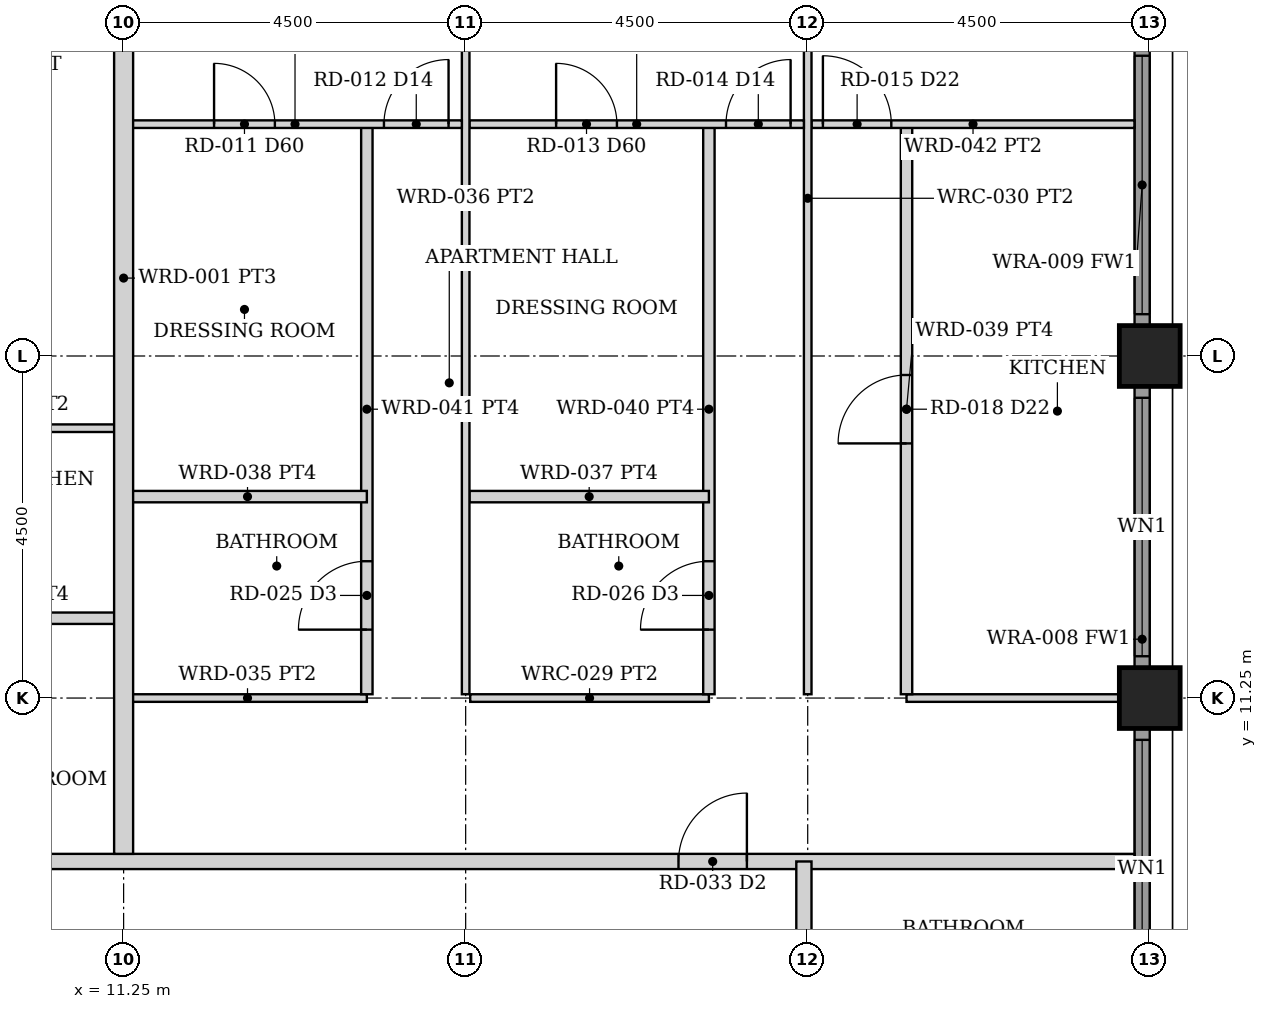
"""IFC4 building model, lengths in metres.
Left out: names, types, materials, properties, quantities, classifications, styles, units other than length and angle.
Written with IfcOpenShell. Run it as: python <this file> out.ifc"""

import sys

from ifc_helpers import new_model, si_unit, direction, frame, frame_2d, origin, origin_2d, place, context, subcontext, project, spatial, rectangle, hollow_rectangle, extrude, element, fill, save


model = new_model("IFC4")
c1 = context("Model", 3, precision=1e-05, world=origin(), true_north=direction((0.0, 1.0)))
c2 = subcontext(c1, "Body", "Model", "MODEL_VIEW")
j1 = project(units=[si_unit("LENGTHUNIT", "METRE"), si_unit("PLANEANGLEUNIT", "RADIAN")], contexts=[c1])
p1 = place(None, origin())
s1 = spatial("IfcSite", under=j1, at=p1, CompositionType="ELEMENT")
p2 = place(p1, origin())
s2 = spatial("IfcBuilding", under=s1, at=p2, CompositionType="ELEMENT")
p3 = place(p2, frame((0.0, 0.0, 58.0)))
s3 = spatial("IfcBuildingStorey", under=s2, at=p3, CompositionType="ELEMENT", Elevation=58.0)
for number, where, z_axis, x_axis in (
    (1, (24.75, 11.25, 0.0), (0.0, 0.0, 1.0), (1.0, 0.0, 0.0)),
    (2, (24.75, 15.75, 0.0), (0.0, 0.0, 1.0), (1.0, 0.0, 0.0)),
):
    element("IfcColumn", number, at=place(p3, frame(where, z_axis=z_axis, x_axis=x_axis)), inside=s3, PredefinedType="COLUMN", context=c2, shape_type="SweptSolid", body=[
        extrude(hollow_rectangle(XDim=0.8, YDim=0.8, WallThickness=0.06, at=origin_2d()), origin(), (0.0, 0.0, 1.0), 3.5),
    ])
p4 = place(p3, frame((24.65, 7.155, 0.0), z_axis=(0.0, 0.0, 1.0), x_axis=(0.0, 1.0, 0.0)))
e3 = element("IfcWall", 3, at=p4, inside=s3, PredefinedType="SOLIDWALL", context=c2, shape_type="SweptSolid", body=[
    extrude(rectangle(XDim=3.69, YDim=0.2, at=frame_2d((1.845, 0.0))), origin(), (0.0, 0.0, 1.0), 2.379),
])
p5 = place(p4, frame((0.145, 0.0, 0.3)))
e4 = element("IfcOpeningElement", 4, at=p5, cuts=e3, PredefinedType="OPENING", context=c2, shape_type="SweptSolid", body=[
    extrude(rectangle(XDim=3.4, YDim=1.929, at=frame_2d((1.7, 0.964))), frame((0.0, 0.11, 0.0), z_axis=(0.0, -1.0, 0.0), x_axis=(1.0, 0.0, 0.0)), (0.0, 0.0, 1.0), 0.22),
])
p6 = place(p3, frame((24.65, 11.655, 0.0), z_axis=(0.0, 0.0, 1.0), x_axis=(0.0, 1.0, 0.0)))
e5 = element("IfcWall", 5, at=p6, inside=s3, PredefinedType="SOLIDWALL", context=c2, shape_type="SweptSolid", body=[
    extrude(rectangle(XDim=3.69, YDim=0.2, at=frame_2d((1.845, 0.0))), origin(), (0.0, 0.0, 1.0), 2.379),
])
p7 = place(p6, frame((0.145, 0.0, 0.3)))
e6 = element("IfcOpeningElement", 6, at=p7, cuts=e5, PredefinedType="OPENING", context=c2, shape_type="SweptSolid", body=[
    extrude(rectangle(XDim=3.4, YDim=1.929, at=frame_2d((1.7, 0.964))), frame((0.0, 0.11, 0.0), z_axis=(0.0, -1.0, 0.0), x_axis=(1.0, 0.0, 0.0)), (0.0, 0.0, 1.0), 0.22),
])
p8 = place(p3, frame((24.65, 16.155, 0.0), z_axis=(0.0, 0.0, 1.0), x_axis=(0.0, 1.0, 0.0)))
e7 = element("IfcWall", 7, at=p8, inside=s3, PredefinedType="SOLIDWALL", context=c2, shape_type="SweptSolid", body=[
    extrude(rectangle(XDim=3.69, YDim=0.2, at=frame_2d((1.845, 0.0))), origin(), (0.0, 0.0, 1.0), 2.379),
])
p9 = place(p8, frame((0.145, 0.0, 0.3)))
e8 = element("IfcOpeningElement", 8, at=p9, cuts=e7, PredefinedType="OPENING", context=c2, shape_type="SweptSolid", body=[
    extrude(rectangle(XDim=3.4, YDim=1.929, at=frame_2d((1.7, 0.964))), frame((0.0, 0.11, 0.0), z_axis=(0.0, -1.0, 0.0), x_axis=(1.0, 0.0, 0.0)), (0.0, 0.0, 1.0), 0.22),
])
p10 = place(p3, frame((-24.55, 9.1, 0.0), z_axis=(0.0, 0.0, 1.0), x_axis=(1.0, 0.0, 0.0)))
e9 = element("IfcWall", 9, at=p10, inside=s3, PredefinedType="PARTITIONING", context=c2, shape_type="SweptSolid", body=[
    extrude(rectangle(XDim=49.1, YDim=0.2, at=frame_2d((24.55, 0.0))), origin(), (0.0, 0.0, 1.0), 2.373),
])
p11 = place(p10, frame((5.1, 0.0, 0.0)))
e10 = element("IfcOpeningElement", 10, at=p11, cuts=e9, PredefinedType="OPENING", context=c2, shape_type="SweptSolid", body=[
    extrude(rectangle(XDim=0.9, YDim=2.1, at=frame_2d((0.45, 1.05))), frame((0.0, 0.11, 0.0), z_axis=(0.0, -1.0, 0.0), x_axis=(1.0, 0.0, 0.0)), (0.0, 0.0, 1.0), 0.22),
])
p12 = place(p10, frame((13.5, 0.0, 0.0)))
e11 = element("IfcOpeningElement", 11, at=p12, cuts=e9, PredefinedType="OPENING", context=c2, shape_type="SweptSolid", body=[
    extrude(rectangle(XDim=0.9, YDim=2.1, at=frame_2d((0.45, 1.05))), frame((0.0, 0.11, 0.0), z_axis=(0.0, -1.0, 0.0), x_axis=(1.0, 0.0, 0.0)), (0.0, 0.0, 1.0), 0.22),
])
p13 = place(p10, frame((18.1, 0.0, 0.0)))
e12 = element("IfcOpeningElement", 12, at=p13, cuts=e9, PredefinedType="OPENING", context=c2, shape_type="SweptSolid", body=[
    extrude(rectangle(XDim=0.9, YDim=2.1, at=frame_2d((0.45, 1.05))), frame((0.0, 0.11, 0.0), z_axis=(0.0, -1.0, 0.0), x_axis=(1.0, 0.0, 0.0)), (0.0, 0.0, 1.0), 0.22),
])
p14 = place(p10, frame((31.5, 0.0, 0.0)))
e13 = element("IfcOpeningElement", 13, at=p14, cuts=e9, PredefinedType="OPENING", context=c2, shape_type="SweptSolid", body=[
    extrude(rectangle(XDim=0.9, YDim=2.1, at=frame_2d((0.45, 1.05))), frame((0.0, 0.11, 0.0), z_axis=(0.0, -1.0, 0.0), x_axis=(1.0, 0.0, 0.0)), (0.0, 0.0, 1.0), 0.22),
])
p15 = place(p10, frame((43.1, 0.0, 0.0)))
e14 = element("IfcOpeningElement", 14, at=p15, cuts=e9, PredefinedType="OPENING", context=c2, shape_type="SweptSolid", body=[
    extrude(rectangle(XDim=0.9, YDim=2.1, at=frame_2d((0.45, 1.05))), frame((0.0, 0.11, 0.0), z_axis=(0.0, -1.0, 0.0), x_axis=(1.0, 0.0, 0.0)), (0.0, 0.0, 1.0), 0.22),
])
p16 = place(p3, frame((20.2, -9.1, 0.0), z_axis=(0.0, 0.0, 1.0), x_axis=(0.0, 1.0, 0.0)))
e15 = element("IfcWall", 15, at=p16, inside=s3, PredefinedType="PARTITIONING", context=c2, shape_type="SweptSolid", body=[
    extrude(rectangle(XDim=18.2, YDim=0.2, at=frame_2d((9.1, 0.0))), origin(), (0.0, 0.0, 1.0), 2.373),
])
p17 = place(p16, frame((6.4, 0.0, 0.0)))
e16 = element("IfcOpeningElement", 16, at=p17, cuts=e15, PredefinedType="OPENING", context=c2, shape_type="SweptSolid", body=[
    extrude(rectangle(XDim=0.9, YDim=2.1, at=frame_2d((0.45, 1.05))), frame((0.0, 0.11, 0.0), z_axis=(0.0, -1.0, 0.0), x_axis=(1.0, 0.0, 0.0)), (0.0, 0.0, 1.0), 0.22),
])
p18 = place(p3, frame((8.1, 12.3, 0.0), z_axis=(0.0, 0.0, 1.0), x_axis=(1.0, 0.0, 0.0)))
e17 = element("IfcWall", 17, at=p18, inside=s3, PredefinedType="PARTITIONING", context=c2, shape_type="SweptSolid", body=[
    extrude(rectangle(XDim=3.05, YDim=0.15, at=frame_2d((1.525, 0.0))), origin(), (0.0, 0.0, 1.0), 2.373),
])
p19 = place(p3, frame((8.1, 14.8, 0.0), z_axis=(0.0, 0.0, 1.0), x_axis=(1.0, 0.0, 0.0)))
e18 = element("IfcWall", 18, at=p19, inside=s3, PredefinedType="PARTITIONING", context=c2, shape_type="SweptSolid", body=[
    extrude(rectangle(XDim=3.05, YDim=0.1, at=frame_2d((1.525, 0.0))), origin(), (0.0, 0.0, 1.0), 2.373),
])
p20 = place(p3, frame((21.55, 11.25, 0.0), z_axis=(0.0, 0.0, 1.0), x_axis=(1.0, 0.0, 0.0)))
e19 = element("IfcWall", 19, at=p20, inside=s3, PredefinedType="PARTITIONING", context=c2, shape_type="SweptSolid", body=[
    extrude(rectangle(XDim=2.8, YDim=0.1, at=frame_2d((1.4, 0.0))), origin(), (0.0, 0.0, 1.0), 2.373),
])
p21 = place(p3, frame((21.55, 11.3, 0.0), z_axis=(0.0, 0.0, 1.0), x_axis=(0.0, 1.0, 0.0)))
e20 = element("IfcWall", 20, at=p21, inside=s3, PredefinedType="PARTITIONING", context=c2, shape_type="SweptSolid", body=[
    extrude(rectangle(XDim=7.5, YDim=0.15, at=frame_2d((3.75, 0.0))), origin(), (0.0, 0.0, 1.0), 2.373),
])
p22 = place(p21, frame((3.3, 0.0, 0.0)))
e21 = element("IfcOpeningElement", 21, at=p22, cuts=e20, PredefinedType="OPENING", context=c2, shape_type="SweptSolid", body=[
    extrude(rectangle(XDim=0.9, YDim=2.1, at=frame_2d((0.45, 1.05))), frame((0.0, 0.085, 0.0), z_axis=(0.0, -1.0, 0.0), x_axis=(1.0, 0.0, 0.0)), (0.0, 0.0, 1.0), 0.17),
])
p23 = place(p3, frame((20.3, 18.8, 0.0), z_axis=(0.0, 0.0, 1.0), x_axis=(1.0, 0.0, 0.0)))
e22 = element("IfcWall", 22, at=p23, inside=s3, PredefinedType="PARTITIONING", context=c2, shape_type="SweptSolid", body=[
    extrude(rectangle(XDim=4.25, YDim=0.1, at=frame_2d((2.125, 0.0))), origin(), (0.0, 0.0, 1.0), 2.373),
])
p24 = place(p23, frame((0.15, 0.0, 0.0)))
e23 = element("IfcOpeningElement", 23, at=p24, cuts=e22, PredefinedType="OPENING", context=c2, shape_type="SweptSolid", body=[
    extrude(rectangle(XDim=0.9, YDim=2.1, at=frame_2d((0.45, 1.05))), frame((0.0, 0.06, 0.0), z_axis=(0.0, -1.0, 0.0), x_axis=(1.0, 0.0, 0.0)), (0.0, 0.0, 1.0), 0.12),
])
p25 = place(p3, frame((20.25, 11.3, 0.0), z_axis=(0.0, 0.0, 1.0), x_axis=(0.0, 1.0, 0.0)))
e24 = element("IfcWall", 24, at=p25, inside=s3, PredefinedType="PARTITIONING", context=c2, shape_type="SweptSolid", body=[
    extrude(rectangle(XDim=13.05, YDim=0.1, at=frame_2d((6.525, 0.0))), origin(), (0.0, 0.0, 1.0), 2.373),
])
p26 = place(p3, frame((15.81, 11.25, 0.0), z_axis=(0.0, 0.0, 1.0), x_axis=(1.0, 0.0, 0.0)))
e25 = element("IfcWall", 25, at=p26, inside=s3, PredefinedType="PARTITIONING", context=c2, shape_type="SweptSolid", body=[
    extrude(rectangle(XDim=3.14, YDim=0.1, at=frame_2d((1.57, 0.0))), origin(), (0.0, 0.0, 1.0), 2.373),
])
p27 = place(p3, frame((18.95, 11.3, 0.0), z_axis=(0.0, 0.0, 1.0), x_axis=(0.0, 1.0, 0.0)))
e26 = element("IfcWall", 26, at=p27, inside=s3, PredefinedType="PARTITIONING", context=c2, shape_type="SweptSolid", body=[
    extrude(rectangle(XDim=7.5, YDim=0.15, at=frame_2d((3.75, 0.0))), origin(), (0.0, 0.0, 1.0), 2.373),
])
p28 = place(p27, frame((0.85, 0.0, 0.0)))
e27 = element("IfcOpeningElement", 27, at=p28, cuts=e26, PredefinedType="OPENING", context=c2, shape_type="SweptSolid", body=[
    extrude(rectangle(XDim=0.9, YDim=2.1, at=frame_2d((0.45, 1.05))), frame((0.0, 0.085, 0.0), z_axis=(0.0, -1.0, 0.0), x_axis=(1.0, 0.0, 0.0)), (0.0, 0.0, 1.0), 0.17),
])
p29 = place(p3, frame((15.8, 18.8, 0.0), z_axis=(0.0, 0.0, 1.0), x_axis=(1.0, 0.0, 0.0)))
e28 = element("IfcWall", 28, at=p29, inside=s3, PredefinedType="PARTITIONING", context=c2, shape_type="SweptSolid", body=[
    extrude(rectangle(XDim=4.4, YDim=0.1, at=frame_2d((2.2, 0.0))), origin(), (0.0, 0.0, 1.0), 2.373),
])
p30 = place(p29, frame((3.375, 0.0, 0.0)))
e29 = element("IfcOpeningElement", 29, at=p30, cuts=e28, PredefinedType="OPENING", context=c2, shape_type="SweptSolid", body=[
    extrude(rectangle(XDim=0.85, YDim=2.1, at=frame_2d((0.425, 1.05))), frame((0.0, 0.06, 0.0), z_axis=(0.0, -1.0, 0.0), x_axis=(1.0, 0.0, 0.0)), (0.0, 0.0, 1.0), 0.12),
])
p31 = place(p29, frame((1.14, 0.0, 0.0)))
e30 = element("IfcOpeningElement", 30, at=p31, cuts=e28, PredefinedType="OPENING", context=c2, shape_type="SweptSolid", body=[
    extrude(rectangle(XDim=0.8, YDim=2.1, at=frame_2d((0.4, 1.05))), frame((0.0, 0.06, 0.0), z_axis=(0.0, -1.0, 0.0), x_axis=(1.0, 0.0, 0.0)), (0.0, 0.0, 1.0), 0.12),
])
p32 = place(p3, frame((15.8, 13.9, 0.0), z_axis=(0.0, 0.0, 1.0), x_axis=(1.0, 0.0, 0.0)))
e31 = element("IfcWall", 31, at=p32, inside=s3, PredefinedType="PARTITIONING", context=c2, shape_type="SweptSolid", body=[
    extrude(rectangle(XDim=3.15, YDim=0.15, at=frame_2d((1.575, 0.0))), origin(), (0.0, 0.0, 1.0), 2.373),
])
p33 = place(p3, frame((15.75, 11.3, 0.0), z_axis=(0.0, 0.0, 1.0), x_axis=(0.0, 1.0, 0.0)))
e32 = element("IfcWall", 32, at=p33, inside=s3, PredefinedType="PARTITIONING", context=c2, shape_type="SweptSolid", body=[
    extrude(rectangle(XDim=13.05, YDim=0.1, at=frame_2d((6.525, 0.0))), origin(), (0.0, 0.0, 1.0), 2.373),
])
p34 = place(p3, frame((11.31, 11.25, 0.0), z_axis=(0.0, 0.0, 1.0), x_axis=(1.0, 0.0, 0.0)))
e33 = element("IfcWall", 33, at=p34, inside=s3, PredefinedType="PARTITIONING", context=c2, shape_type="SweptSolid", body=[
    extrude(rectangle(XDim=3.14, YDim=0.1, at=frame_2d((1.57, 0.0))), origin(), (0.0, 0.0, 1.0), 2.373),
])
p35 = place(p3, frame((14.45, 11.3, 0.0), z_axis=(0.0, 0.0, 1.0), x_axis=(0.0, 1.0, 0.0)))
e34 = element("IfcWall", 34, at=p35, inside=s3, PredefinedType="PARTITIONING", context=c2, shape_type="SweptSolid", body=[
    extrude(rectangle(XDim=7.5, YDim=0.15, at=frame_2d((3.75, 0.0))), origin(), (0.0, 0.0, 1.0), 2.373),
])
p36 = place(p35, frame((0.85, 0.0, 0.0)))
e35 = element("IfcOpeningElement", 35, at=p36, cuts=e34, PredefinedType="OPENING", context=c2, shape_type="SweptSolid", body=[
    extrude(rectangle(XDim=0.9, YDim=2.1, at=frame_2d((0.45, 1.05))), frame((0.0, 0.085, 0.0), z_axis=(0.0, -1.0, 0.0), x_axis=(1.0, 0.0, 0.0)), (0.0, 0.0, 1.0), 0.17),
])
p37 = place(p3, frame((11.31, 18.8, 0.0), z_axis=(0.0, 0.0, 1.0), x_axis=(1.0, 0.0, 0.0)))
e36 = element("IfcWall", 36, at=p37, inside=s3, PredefinedType="PARTITIONING", context=c2, shape_type="SweptSolid", body=[
    extrude(rectangle(XDim=4.39, YDim=0.1, at=frame_2d((2.195, 0.0))), origin(), (0.0, 0.0, 1.0), 2.373),
])
p38 = place(p37, frame((3.365, 0.0, 0.0)))
e37 = element("IfcOpeningElement", 37, at=p38, cuts=e36, PredefinedType="OPENING", context=c2, shape_type="SweptSolid", body=[
    extrude(rectangle(XDim=0.85, YDim=2.1, at=frame_2d((0.425, 1.05))), frame((0.0, 0.06, 0.0), z_axis=(0.0, -1.0, 0.0), x_axis=(1.0, 0.0, 0.0)), (0.0, 0.0, 1.0), 0.12),
])
p39 = place(p37, frame((1.13, 0.0, 0.0)))
e38 = element("IfcOpeningElement", 38, at=p39, cuts=e36, PredefinedType="OPENING", context=c2, shape_type="SweptSolid", body=[
    extrude(rectangle(XDim=0.8, YDim=2.1, at=frame_2d((0.4, 1.05))), frame((0.0, 0.06, 0.0), z_axis=(0.0, -1.0, 0.0), x_axis=(1.0, 0.0, 0.0)), (0.0, 0.0, 1.0), 0.12),
])
p40 = place(p3, frame((11.31, 13.9, 0.0), z_axis=(0.0, 0.0, 1.0), x_axis=(1.0, 0.0, 0.0)))
e39 = element("IfcWall", 39, at=p40, inside=s3, PredefinedType="PARTITIONING", context=c2, shape_type="SweptSolid", body=[
    extrude(rectangle(XDim=3.14, YDim=0.15, at=frame_2d((1.57, 0.0))), origin(), (0.0, 0.0, 1.0), 2.373),
])
p41 = place(p3, frame((11.25, 9.2, 0.0), z_axis=(0.0, 0.0, 1.0), x_axis=(0.0, 1.0, 0.0)))
e40 = element("IfcWall", 40, at=p41, inside=s3, PredefinedType="PARTITIONING", context=c2, shape_type="SweptSolid", body=[
    extrude(rectangle(XDim=15.15, YDim=0.25, at=frame_2d((7.575, 0.0))), origin(), (0.0, 0.0, 1.0), 2.373),
])
p42 = place(p5, origin())
e41 = element("IfcWindow", 41, at=p42, inside=s3, PartitioningType="SINGLE_PANEL", PredefinedType="WINDOW", context=c2, shape_type="SweptSolid", body=[
    extrude(rectangle(XDim=3.4, YDim=1.929, at=frame_2d((1.7, 0.964))), frame((0.0, 0.03, 0.0), z_axis=(0.0, -1.0, 0.0), x_axis=(1.0, 0.0, 0.0)), (0.0, 0.0, 1.0), 0.06),
])
fill(e4, e41)
p43 = place(p7, origin())
e42 = element("IfcWindow", 42, at=p43, inside=s3, PartitioningType="SINGLE_PANEL", PredefinedType="WINDOW", context=c2, shape_type="SweptSolid", body=[
    extrude(rectangle(XDim=3.4, YDim=1.929, at=frame_2d((1.7, 0.964))), frame((0.0, 0.03, 0.0), z_axis=(0.0, -1.0, 0.0), x_axis=(1.0, 0.0, 0.0)), (0.0, 0.0, 1.0), 0.06),
])
fill(e6, e42)
p44 = place(p9, origin())
e43 = element("IfcWindow", 43, at=p44, inside=s3, PartitioningType="SINGLE_PANEL", PredefinedType="WINDOW", context=c2, shape_type="SweptSolid", body=[
    extrude(rectangle(XDim=3.4, YDim=1.929, at=frame_2d((1.7, 0.964))), frame((0.0, 0.03, 0.0), z_axis=(0.0, -1.0, 0.0), x_axis=(1.0, 0.0, 0.0)), (0.0, 0.0, 1.0), 0.06),
])
fill(e8, e43)
p45 = place(p15, origin())
e44 = element("IfcDoor", 44, at=p45, inside=s3, OperationType="SINGLE_SWING_RIGHT", PredefinedType="DOOR", context=c2, shape_type="SweptSolid", body=[
    extrude(rectangle(XDim=0.9, YDim=2.1, at=frame_2d((0.45, 1.05))), frame((0.0, 0.025, 0.0), z_axis=(0.0, -1.0, 0.0), x_axis=(1.0, 0.0, 0.0)), (0.0, 0.0, 1.0), 0.05),
])
fill(e14, e44)
p46 = place(p22, origin())
e45 = element("IfcDoor", 45, at=p46, inside=s3, OperationType="SINGLE_SWING_LEFT", PredefinedType="DOOR", context=c2, shape_type="SweptSolid", body=[
    extrude(rectangle(XDim=0.9, YDim=2.1, at=frame_2d((0.45, 1.05))), frame((0.0, 0.025, 0.0), z_axis=(0.0, -1.0, 0.0), x_axis=(1.0, 0.0, 0.0)), (0.0, 0.0, 1.0), 0.05),
])
fill(e21, e45)
p47 = place(p24, origin())
e46 = element("IfcDoor", 46, at=p47, inside=s3, OperationType="SINGLE_SWING_LEFT", PredefinedType="DOOR", context=c2, shape_type="SweptSolid", body=[
    extrude(rectangle(XDim=0.9, YDim=2.1, at=frame_2d((0.45, 1.05))), frame((0.0, 0.025, 0.0), z_axis=(0.0, -1.0, 0.0), x_axis=(1.0, 0.0, 0.0)), (0.0, 0.0, 1.0), 0.05),
])
fill(e23, e46)
p48 = place(p30, origin())
e47 = element("IfcDoor", 47, at=p48, inside=s3, OperationType="SINGLE_SWING_RIGHT", PredefinedType="DOOR", context=c2, shape_type="SweptSolid", body=[
    extrude(rectangle(XDim=0.85, YDim=2.1, at=frame_2d((0.425, 1.05))), frame((0.0, 0.025, 0.0), z_axis=(0.0, -1.0, 0.0), x_axis=(1.0, 0.0, 0.0)), (0.0, 0.0, 1.0), 0.05),
])
fill(e29, e47)
p49 = place(p28, origin())
e48 = element("IfcDoor", 48, at=p49, inside=s3, OperationType="SINGLE_SWING_LEFT", PredefinedType="DOOR", context=c2, shape_type="SweptSolid", body=[
    extrude(rectangle(XDim=0.9, YDim=2.1, at=frame_2d((0.45, 1.05))), frame((0.0, 0.025, 0.0), z_axis=(0.0, -1.0, 0.0), x_axis=(1.0, 0.0, 0.0)), (0.0, 0.0, 1.0), 0.05),
])
fill(e27, e48)
p50 = place(p31, origin())
e49 = element("IfcDoor", 49, at=p50, inside=s3, OperationType="SINGLE_SWING_LEFT", PredefinedType="DOOR", context=c2, shape_type="SweptSolid", body=[
    extrude(rectangle(XDim=0.8, YDim=2.1, at=frame_2d((0.4, 1.05))), frame((0.0, 0.025, 0.0), z_axis=(0.0, -1.0, 0.0), x_axis=(1.0, 0.0, 0.0)), (0.0, 0.0, 1.0), 0.05),
])
fill(e30, e49)
p51 = place(p38, origin())
e50 = element("IfcDoor", 50, at=p51, inside=s3, OperationType="SINGLE_SWING_RIGHT", PredefinedType="DOOR", context=c2, shape_type="SweptSolid", body=[
    extrude(rectangle(XDim=0.85, YDim=2.1, at=frame_2d((0.425, 1.05))), frame((0.0, 0.025, 0.0), z_axis=(0.0, -1.0, 0.0), x_axis=(1.0, 0.0, 0.0)), (0.0, 0.0, 1.0), 0.05),
])
fill(e37, e50)
p52 = place(p36, origin())
e51 = element("IfcDoor", 51, at=p52, inside=s3, OperationType="SINGLE_SWING_LEFT", PredefinedType="DOOR", context=c2, shape_type="SweptSolid", body=[
    extrude(rectangle(XDim=0.9, YDim=2.1, at=frame_2d((0.45, 1.05))), frame((0.0, 0.025, 0.0), z_axis=(0.0, -1.0, 0.0), x_axis=(1.0, 0.0, 0.0)), (0.0, 0.0, 1.0), 0.05),
])
fill(e35, e51)
p53 = place(p39, origin())
e52 = element("IfcDoor", 52, at=p53, inside=s3, OperationType="SINGLE_SWING_LEFT", PredefinedType="DOOR", context=c2, shape_type="SweptSolid", body=[
    extrude(rectangle(XDim=0.8, YDim=2.1, at=frame_2d((0.4, 1.05))), frame((0.0, 0.025, 0.0), z_axis=(0.0, -1.0, 0.0), x_axis=(1.0, 0.0, 0.0)), (0.0, 0.0, 1.0), 0.05),
])
fill(e38, e52)
save(model, sys.argv[1])
